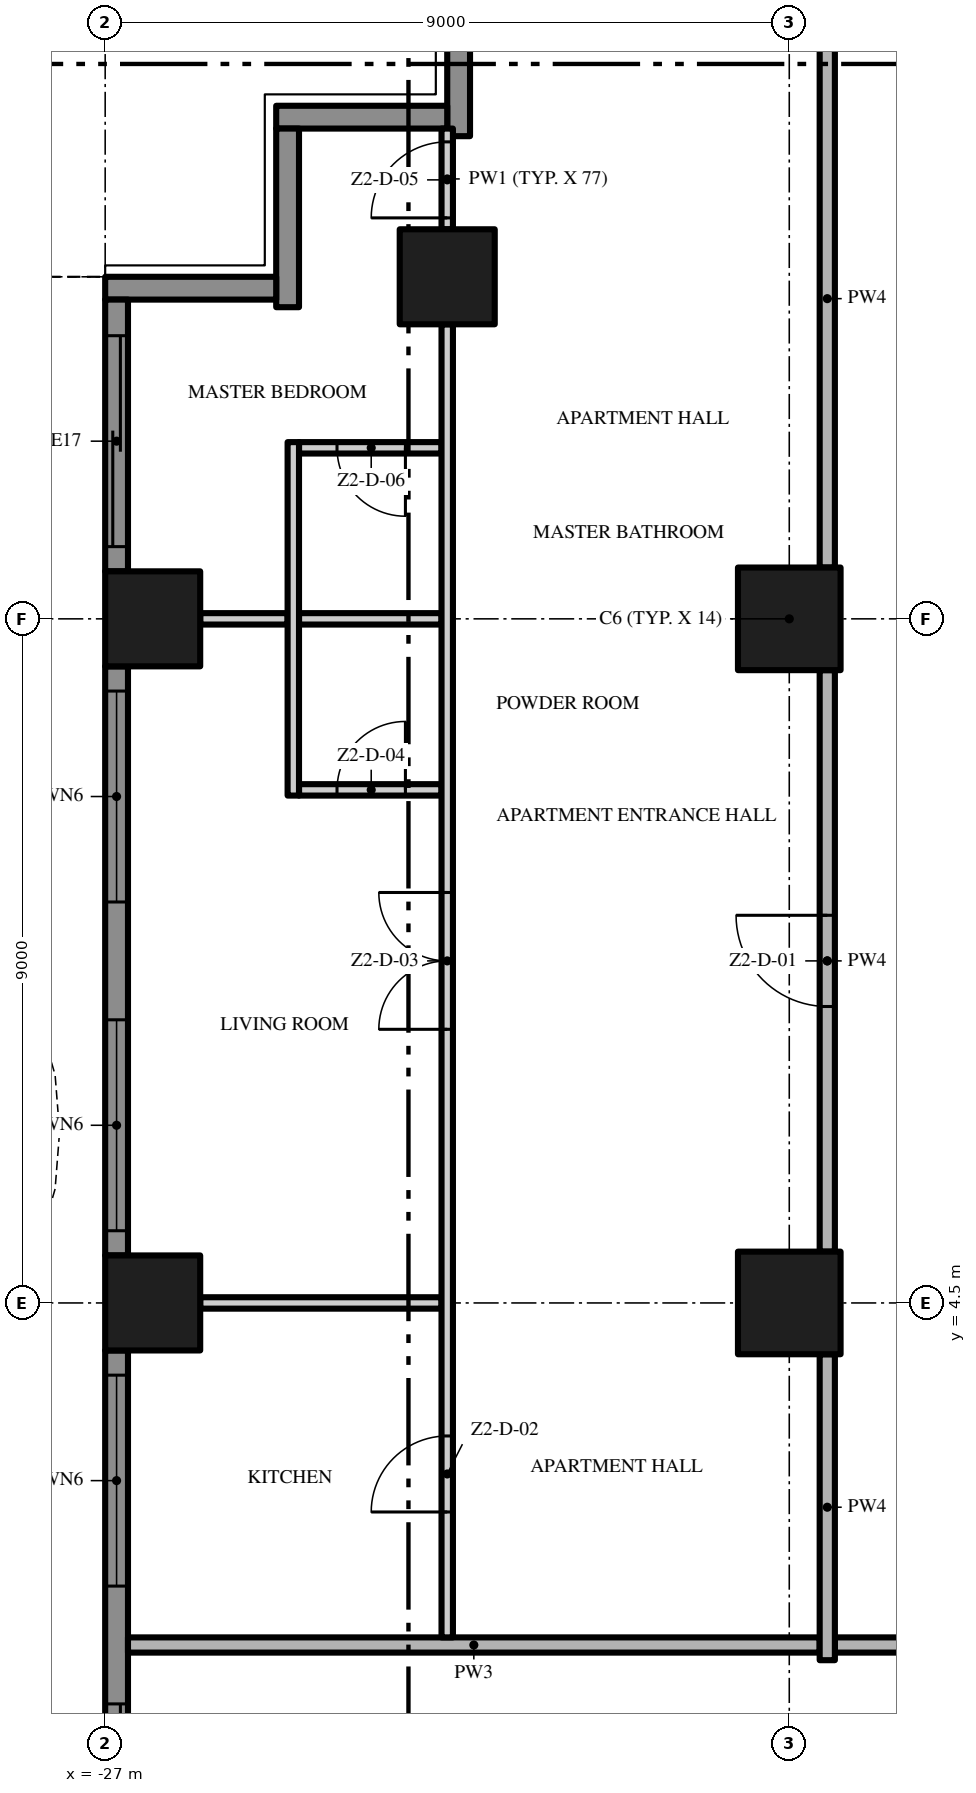
"""IFC4 building model, lengths in metres.
Left out: names, types, materials, properties, quantities, classifications, styles, units other than length and angle.
Written with IfcOpenShell. Run it as: python <this file> out.ifc"""

import sys

from ifc_helpers import new_model, si_unit, direction, frame, frame_2d, origin, origin_2d, place, context, subcontext, project, spatial, polyline, rectangle, outline, extrude, element, fill, save


model = new_model("IFC4")
c1 = context("Model", 3, precision=1e-05, world=origin(), true_north=direction((0.0, 1.0)))
c2 = subcontext(c1, "Body", "Model", "MODEL_VIEW")
j1 = project(units=[si_unit("LENGTHUNIT", "METRE"), si_unit("PLANEANGLEUNIT", "RADIAN")], contexts=[c1])
p1 = place(None, origin())
s1 = spatial("IfcSite", under=j1, at=p1, CompositionType="ELEMENT")
p2 = place(p1, origin())
s2 = spatial("IfcBuilding", under=s1, at=p2, CompositionType="ELEMENT")
p3 = place(p2, frame((0.0, 0.0, 107.4)))
s3 = spatial("IfcBuildingStorey", under=s2, at=p3, CompositionType="ELEMENT", Elevation=107.4)
for number, where, z_axis, x_axis in (
    (1, (-18.0, 13.5, 0.0), (0.0, 0.0, 1.0), (1.0, 0.0, 0.0)),
    (2, (-18.0, 4.5, 0.0), (0.0, 0.0, 1.0), (1.0, 0.0, 0.0)),
):
    element("IfcColumn", number, at=place(p3, frame(where, z_axis=z_axis, x_axis=x_axis)), inside=s3, PredefinedType="COLUMN", context=c2, shape_type="SweptSolid", body=[
        extrude(rectangle(XDim=1.35, YDim=1.35, at=origin_2d()), origin(), (0.0, 0.0, 1.0), 3.5),
    ])
for number, where, z_axis, x_axis in (
    (3, (-26.375, 13.5, 0.0), (0.0, 0.0, 1.0), (1.0, 0.0, 0.0)),
    (4, (-22.5, 18.0, 0.0), (0.0, 0.0, 1.0), (1.0, 0.0, 0.0)),
    (5, (-26.375, 4.5, 0.0), (0.0, 0.0, 1.0), (1.0, 0.0, 0.0)),
):
    element("IfcColumn", number, at=place(p3, frame(where, z_axis=z_axis, x_axis=x_axis)), inside=s3, PredefinedType="COLUMN", context=c2, shape_type="SweptSolid", body=[
        extrude(rectangle(XDim=1.25, YDim=1.25, at=origin_2d()), origin(), (0.0, 0.0, 1.0), 3.5),
    ])
p4 = place(p3, frame((-22.35, 19.85, 0.0), z_axis=(0.0, 0.0, 1.0), x_axis=(0.0, 1.0, 0.0)))
e6 = element("IfcWall", 6, at=p4, inside=s3, PredefinedType="SOLIDWALL", context=c2, shape_type="SweptSolid", body=[
    extrude(rectangle(XDim=2.35, YDim=0.3, at=frame_2d((1.175, 0.0))), origin(), (0.0, 0.0, 1.0), 3.5),
])
p5 = place(p3, frame((-24.75, 20.1, 0.0), z_axis=(0.0, 0.0, 1.0), x_axis=(1.0, 0.0, 0.0)))
e7 = element("IfcWall", 7, at=p5, inside=s3, PredefinedType="SOLIDWALL", context=c2, shape_type="SweptSolid", body=[
    extrude(rectangle(XDim=2.25, YDim=0.3, at=frame_2d((1.125, 0.0))), origin(), (0.0, 0.0, 1.0), 3.5),
])
p6 = place(p3, frame((-24.6, 17.6, 0.0), z_axis=(0.0, 0.0, 1.0), x_axis=(0.0, 1.0, 0.0)))
e8 = element("IfcWall", 8, at=p6, inside=s3, PredefinedType="SOLIDWALL", context=c2, shape_type="SweptSolid", body=[
    extrude(rectangle(XDim=2.35, YDim=0.3, at=frame_2d((1.175, 0.0))), origin(), (0.0, 0.0, 1.0), 3.5),
])
p7 = place(p3, frame((-27.0, 17.85, 0.0), z_axis=(0.0, 0.0, 1.0), x_axis=(1.0, 0.0, 0.0)))
e9 = element("IfcWall", 9, at=p7, inside=s3, PredefinedType="SOLIDWALL", context=c2, shape_type="SweptSolid", body=[
    extrude(rectangle(XDim=2.25, YDim=0.3, at=frame_2d((1.125, 0.0))), origin(), (0.0, 0.0, 1.0), 3.5),
])
p8 = place(p3, frame((-26.85, 14.125, 0.0), z_axis=(0.0, 0.0, 1.0), x_axis=(0.0, 1.0, 0.0)))
e10 = element("IfcWall", 10, at=p8, inside=s3, PredefinedType="SOLIDWALL", context=c2, shape_type="SweptSolid", body=[
    extrude(rectangle(XDim=3.575, YDim=0.3, at=frame_2d((1.788, 0.0))), origin(), (0.0, 0.0, 1.0), 3.5),
])
p9 = place(p8, frame((0.325, 0.0, 0.0)))
e11 = element("IfcOpeningElement", 11, at=p9, cuts=e10, PredefinedType="OPENING", context=c2, shape_type="SweptSolid", body=[
    extrude(rectangle(XDim=2.775, YDim=2.4, at=frame_2d((1.387, 1.2))), frame((0.0, 0.16, 0.0), z_axis=(0.0, -1.0, 0.0), x_axis=(1.0, 0.0, 0.0)), (0.0, 0.0, 1.0), 0.32),
])
p10 = place(p3, frame((-26.85, 5.125, 0.0), z_axis=(0.0, 0.0, 1.0), x_axis=(0.0, 1.0, 0.0)))
e12 = element("IfcWall", 12, at=p10, inside=s3, PredefinedType="SOLIDWALL", context=c2, shape_type="SweptSolid", body=[
    extrude(rectangle(XDim=7.75, YDim=0.3, at=frame_2d((3.875, 0.0))), origin(), (0.0, 0.0, 1.0), 3.5),
])
p11 = place(p10, frame((4.65, 0.0, 0.45)))
e13 = element("IfcOpeningElement", 13, at=p11, cuts=e12, PredefinedType="OPENING", context=c2, shape_type="SweptSolid", body=[
    extrude(rectangle(XDim=2.775, YDim=2.65, at=frame_2d((1.387, 1.325))), frame((0.0, 0.16, 0.0), z_axis=(0.0, -1.0, 0.0), x_axis=(1.0, 0.0, 0.0)), (0.0, 0.0, 1.0), 0.32),
])
p12 = place(p10, frame((0.325, 0.0, 0.45)))
e14 = element("IfcOpeningElement", 14, at=p12, cuts=e12, PredefinedType="OPENING", context=c2, shape_type="SweptSolid", body=[
    extrude(rectangle(XDim=2.775, YDim=2.65, at=frame_2d((1.387, 1.325))), frame((0.0, 0.16, 0.0), z_axis=(0.0, -1.0, 0.0), x_axis=(1.0, 0.0, 0.0)), (0.0, 0.0, 1.0), 0.32),
])
p13 = place(p3, frame((-26.85, -3.875, 0.0), z_axis=(0.0, 0.0, 1.0), x_axis=(0.0, 1.0, 0.0)))
e15 = element("IfcWall", 15, at=p13, inside=s3, PredefinedType="SOLIDWALL", context=c2, shape_type="SweptSolid", body=[
    extrude(rectangle(XDim=7.75, YDim=0.3, at=frame_2d((3.875, 0.0))), origin(), (0.0, 0.0, 1.0), 3.5),
])
p14 = place(p13, frame((4.65, 0.0, 0.45)))
e16 = element("IfcOpeningElement", 16, at=p14, cuts=e15, PredefinedType="OPENING", context=c2, shape_type="SweptSolid", body=[
    extrude(rectangle(XDim=2.775, YDim=2.65, at=frame_2d((1.387, 1.325))), frame((0.0, 0.16, 0.0), z_axis=(0.0, -1.0, 0.0), x_axis=(1.0, 0.0, 0.0)), (0.0, 0.0, 1.0), 0.32),
])
p15 = place(p13, frame((0.325, 0.0, 0.0)))
e17 = element("IfcOpeningElement", 17, at=p15, cuts=e15, PredefinedType="OPENING", context=c2, shape_type="SweptSolid", body=[
    extrude(rectangle(XDim=2.775, YDim=2.4, at=frame_2d((1.387, 1.2))), frame((0.0, 0.16, 0.0), z_axis=(0.0, -1.0, 0.0), x_axis=(1.0, 0.0, 0.0)), (0.0, 0.0, 1.0), 0.32),
])
p16 = place(p3, origin())
e18 = element("IfcWall", 18, at=p16, inside=s3, PredefinedType="USERDEFINED", context=c2, shape_type="SweptSolid", body=[
    extrude(outline(polyline([(-28.8, 18.0), (-29.505, 16.5), (-29.941, 15.0), (-30.0, 14.25), (-29.941, 13.5), (-29.505, 12.0), (-28.8, 10.5), (-28.095, 9.0), (-27.659, 7.5), (-27.6, 6.75), (-27.659, 6.0), (-28.095, 4.5), (-28.8, 3.0), (-29.505, 1.5), (-29.941, 0.0), (-30.0, -0.75), (-29.941, -1.5), (-29.505, -3.0), (-28.8, -4.5), (-28.095, -6.0), (-27.659, -7.5), (-27.6, -8.25), (-27.659, -9.0), (-28.095, -10.5), (-28.8, -12.0), (-29.505, -13.5), (-29.941, -15.0), (-30.0, -15.75), (-29.941, -16.5), (-29.505, -18.0), (-29.265, -17.93), (-29.694, -16.455), (-29.749, -15.75), (-29.694, -15.045), (-29.271, -13.589), (-28.574, -12.106), (-27.86, -10.589), (-27.411, -9.045), (-27.349, -8.25), (-27.411, -7.455), (-27.86, -5.911), (-28.574, -4.394), (-29.271, -2.911), (-29.694, -1.455), (-29.749, -0.75), (-29.694, -0.045), (-29.271, 1.411), (-28.574, 2.894), (-27.86, 4.411), (-27.411, 5.955), (-27.349, 6.75), (-27.411, 7.545), (-27.86, 9.089), (-28.574, 10.606), (-29.271, 12.089), (-29.694, 13.545), (-29.749, 14.25), (-29.694, 14.955), (-29.271, 16.411), (-28.574, 17.894), (-28.8, 18.0)])), origin(), (0.0, 0.0, 1.0), 0.9),
])
p17 = place(p3, frame((-0.1, 0.0, 0.0), z_axis=(0.0, 0.0, 1.0), x_axis=(-1.0, 0.0, 0.0)))
e19 = element("IfcWall", 19, at=p17, inside=s3, PredefinedType="PARTITIONING", context=c2, shape_type="SweptSolid", body=[
    extrude(rectangle(XDim=17.3, YDim=0.2, at=frame_2d((8.65, 0.0))), origin(), (0.0, 0.0, 1.0), 3.5),
])
p18 = place(p17, frame((8.15, 0.0, 0.0)))
e20 = element("IfcOpeningElement", 20, at=p18, cuts=e19, PredefinedType="OPENING", context=c2, shape_type="SweptSolid", body=[
    extrude(rectangle(XDim=1.5, YDim=2.4, at=frame_2d((0.75, 1.2))), frame((0.0, 0.11, 0.0), z_axis=(0.0, -1.0, 0.0), x_axis=(1.0, 0.0, 0.0)), (0.0, 0.0, 1.0), 0.22),
])
p19 = place(p3, frame((-26.7, 0.0, 0.0), z_axis=(0.0, 0.0, 1.0), x_axis=(1.0, 0.0, 0.0)))
e21 = element("IfcWall", 21, at=p19, inside=s3, PredefinedType="PARTITIONING", context=c2, shape_type="SweptSolid", body=[
    extrude(rectangle(XDim=9.1, YDim=0.2, at=frame_2d((4.55, 0.0))), origin(), (0.0, 0.0, 1.0), 3.5),
])
p20 = place(p3, frame((-25.75, 4.5, 0.0), z_axis=(0.0, 0.0, 1.0), x_axis=(1.0, 0.0, 0.0)))
e22 = element("IfcWall", 22, at=p20, inside=s3, PredefinedType="PARTITIONING", context=c2, shape_type="SweptSolid", body=[
    extrude(rectangle(XDim=3.175, YDim=0.15, at=frame_2d((1.587, 0.0))), origin(), (0.0, 0.0, 1.0), 3.5),
])
p21 = place(p3, frame((-24.45, 11.25, 0.0), z_axis=(0.0, 0.0, 1.0), x_axis=(1.0, 0.0, 0.0)))
e23 = element("IfcWall", 23, at=p21, inside=s3, PredefinedType="PARTITIONING", context=c2, shape_type="SweptSolid", body=[
    extrude(rectangle(XDim=1.875, YDim=0.15, at=frame_2d((0.938, 0.0))), origin(), (0.0, 0.0, 1.0), 3.5),
])
p22 = place(p21, frame((0.5, 0.0, 0.0)))
e24 = element("IfcOpeningElement", 24, at=p22, cuts=e23, PredefinedType="OPENING", context=c2, shape_type="SweptSolid", body=[
    extrude(rectangle(XDim=0.9, YDim=2.1, at=frame_2d((0.45, 1.05))), frame((0.0, 0.085, 0.0), z_axis=(0.0, -1.0, 0.0), x_axis=(1.0, 0.0, 0.0)), (0.0, 0.0, 1.0), 0.17),
])
p23 = place(p3, frame((-25.75, 13.5, 0.0), z_axis=(0.0, 0.0, 1.0), x_axis=(1.0, 0.0, 0.0)))
e25 = element("IfcWall", 25, at=p23, inside=s3, PredefinedType="PARTITIONING", context=c2, shape_type="SweptSolid", body=[
    extrude(rectangle(XDim=1.15, YDim=0.15, at=frame_2d((0.575, 0.0))), origin(), (0.0, 0.0, 1.0), 3.5),
])
p24 = place(p3, frame((-24.45, 13.5, 0.0), z_axis=(0.0, 0.0, 1.0), x_axis=(1.0, 0.0, 0.0)))
e26 = element("IfcWall", 26, at=p24, inside=s3, PredefinedType="PARTITIONING", context=c2, shape_type="SweptSolid", body=[
    extrude(rectangle(XDim=1.875, YDim=0.15, at=frame_2d((0.938, 0.0))), origin(), (0.0, 0.0, 1.0), 3.5),
])
p25 = place(p3, frame((-22.575, 15.75, 0.0), z_axis=(0.0, 0.0, 1.0), x_axis=(-1.0, 0.0, 0.0)))
e27 = element("IfcWall", 27, at=p25, inside=s3, PredefinedType="PARTITIONING", context=c2, shape_type="SweptSolid", body=[
    extrude(rectangle(XDim=1.875, YDim=0.15, at=frame_2d((0.938, 0.0))), origin(), (0.0, 0.0, 1.0), 3.5),
])
p26 = place(p25, frame((0.475, 0.0, 0.0)))
e28 = element("IfcOpeningElement", 28, at=p26, cuts=e27, PredefinedType="OPENING", context=c2, shape_type="SweptSolid", body=[
    extrude(rectangle(XDim=0.9, YDim=2.1, at=frame_2d((0.45, 1.05))), frame((0.0, 0.085, 0.0), z_axis=(0.0, -1.0, 0.0), x_axis=(1.0, 0.0, 0.0)), (0.0, 0.0, 1.0), 0.17),
])
p27 = place(p3, frame((-24.525, 11.175, 0.0), z_axis=(0.0, 0.0, 1.0), x_axis=(0.0, 1.0, 0.0)))
e29 = element("IfcWall", 29, at=p27, inside=s3, PredefinedType="PARTITIONING", context=c2, shape_type="SweptSolid", body=[
    extrude(rectangle(XDim=4.65, YDim=0.15, at=frame_2d((2.325, 0.0))), origin(), (0.0, 0.0, 1.0), 3.5),
])
p28 = place(p3, frame((-22.5, 0.1, 0.0), z_axis=(0.0, 0.0, 1.0), x_axis=(0.0, 1.0, 0.0)))
e30 = element("IfcWall", 30, at=p28, inside=s3, PredefinedType="PARTITIONING", context=c2, shape_type="SweptSolid", body=[
    extrude(rectangle(XDim=17.275, YDim=0.15, at=frame_2d((8.637, 0.0))), origin(), (0.0, 0.0, 1.0), 3.5),
])
p29 = place(p28, frame((1.65, 0.0, 0.0)))
e31 = element("IfcOpeningElement", 31, at=p29, cuts=e30, PredefinedType="OPENING", context=c2, shape_type="SweptSolid", body=[
    extrude(rectangle(XDim=1.0, YDim=2.4, at=frame_2d((0.5, 1.2))), frame((0.0, 0.085, 0.0), z_axis=(0.0, -1.0, 0.0), x_axis=(1.0, 0.0, 0.0)), (0.0, 0.0, 1.0), 0.17),
])
p30 = place(p28, frame((8.0, 0.0, 0.0)))
e32 = element("IfcOpeningElement", 32, at=p30, cuts=e30, PredefinedType="OPENING", context=c2, shape_type="SweptSolid", body=[
    extrude(rectangle(XDim=1.8, YDim=2.4, at=frame_2d((0.9, 1.2))), frame((0.0, 0.085, 0.0), z_axis=(0.0, -1.0, 0.0), x_axis=(1.0, 0.0, 0.0)), (0.0, 0.0, 1.0), 0.17),
])
p31 = place(p3, frame((-22.5, 18.625, 0.0), z_axis=(0.0, 0.0, 1.0), x_axis=(0.0, 1.0, 0.0)))
e33 = element("IfcWall", 33, at=p31, inside=s3, PredefinedType="PARTITIONING", context=c2, shape_type="SweptSolid", body=[
    extrude(rectangle(XDim=1.325, YDim=0.15, at=frame_2d((0.662, 0.0))), origin(), (0.0, 0.0, 1.0), 3.5),
])
p32 = place(p31, frame((0.15, 0.0, 0.0)))
e34 = element("IfcOpeningElement", 34, at=p32, cuts=e33, PredefinedType="OPENING", context=c2, shape_type="SweptSolid", body=[
    extrude(rectangle(XDim=1.0, YDim=2.4, at=frame_2d((0.5, 1.2))), frame((0.0, 0.085, 0.0), z_axis=(0.0, -1.0, 0.0), x_axis=(1.0, 0.0, 0.0)), (0.0, 0.0, 1.0), 0.17),
])
p33 = place(p3, frame((-17.5, -0.2, 0.0), z_axis=(0.0, 0.0, 1.0), x_axis=(0.0, 1.0, 0.0)))
e35 = element("IfcWall", 35, at=p33, inside=s3, PredefinedType="PARTITIONING", context=c2, shape_type="SweptSolid", body=[
    extrude(rectangle(XDim=4.025, YDim=0.2, at=frame_2d((2.013, 0.0))), origin(), (0.0, 0.0, 1.0), 3.5),
])
p34 = place(p3, frame((-17.5, 5.175, 0.0), z_axis=(0.0, 0.0, 1.0), x_axis=(0.0, 1.0, 0.0)))
e36 = element("IfcWall", 36, at=p34, inside=s3, PredefinedType="PARTITIONING", context=c2, shape_type="SweptSolid", body=[
    extrude(rectangle(XDim=7.65, YDim=0.2, at=frame_2d((3.825, 0.0))), origin(), (0.0, 0.0, 1.0), 3.5),
])
p35 = place(p34, frame((3.225, 0.0, 0.0)))
e37 = element("IfcOpeningElement", 37, at=p35, cuts=e36, PredefinedType="OPENING", context=c2, shape_type="SweptSolid", body=[
    extrude(rectangle(XDim=1.2, YDim=2.4, at=frame_2d((0.6, 1.2))), frame((0.0, 0.11, 0.0), z_axis=(0.0, -1.0, 0.0), x_axis=(1.0, 0.0, 0.0)), (0.0, 0.0, 1.0), 0.22),
])
p36 = place(p3, frame((-17.5, 14.175, 0.0), z_axis=(0.0, 0.0, 1.0), x_axis=(0.0, 1.0, 0.0)))
e38 = element("IfcWall", 38, at=p36, inside=s3, PredefinedType="PARTITIONING", context=c2, shape_type="SweptSolid", body=[
    extrude(rectangle(XDim=7.075, YDim=0.2, at=frame_2d((3.538, 0.0))), origin(), (0.0, 0.0, 1.0), 3.5),
])
p37 = place(p9, origin())
e39 = element("IfcDoor", 39, at=p37, inside=s3, OperationType="SINGLE_SWING_LEFT", PredefinedType="DOOR", context=c2, shape_type="SweptSolid", body=[
    extrude(rectangle(XDim=2.775, YDim=2.4, at=frame_2d((1.387, 1.2))), frame((0.0, 0.025, 0.0), z_axis=(0.0, -1.0, 0.0), x_axis=(1.0, 0.0, 0.0)), (0.0, 0.0, 1.0), 0.05),
])
fill(e11, e39)
p38 = place(p11, origin())
e40 = element("IfcWindow", 40, at=p38, inside=s3, PartitioningType="SINGLE_PANEL", PredefinedType="WINDOW", context=c2, shape_type="SweptSolid", body=[
    extrude(rectangle(XDim=2.775, YDim=2.65, at=frame_2d((1.387, 1.325))), frame((0.0, 0.03, 0.0), z_axis=(0.0, -1.0, 0.0), x_axis=(1.0, 0.0, 0.0)), (0.0, 0.0, 1.0), 0.06),
])
fill(e13, e40)
p39 = place(p12, origin())
e41 = element("IfcWindow", 41, at=p39, inside=s3, PartitioningType="SINGLE_PANEL", PredefinedType="WINDOW", context=c2, shape_type="SweptSolid", body=[
    extrude(rectangle(XDim=2.775, YDim=2.65, at=frame_2d((1.387, 1.325))), frame((0.0, 0.03, 0.0), z_axis=(0.0, -1.0, 0.0), x_axis=(1.0, 0.0, 0.0)), (0.0, 0.0, 1.0), 0.06),
])
fill(e14, e41)
p40 = place(p14, origin())
e42 = element("IfcWindow", 42, at=p40, inside=s3, PartitioningType="SINGLE_PANEL", PredefinedType="WINDOW", context=c2, shape_type="SweptSolid", body=[
    extrude(rectangle(XDim=2.775, YDim=2.65, at=frame_2d((1.387, 1.325))), frame((0.0, 0.03, 0.0), z_axis=(0.0, -1.0, 0.0), x_axis=(1.0, 0.0, 0.0)), (0.0, 0.0, 1.0), 0.06),
])
fill(e16, e42)
p41 = place(p15, origin())
e43 = element("IfcDoor", 43, at=p41, inside=s3, OperationType="SINGLE_SWING_LEFT", PredefinedType="DOOR", context=c2, shape_type="SweptSolid", body=[
    extrude(rectangle(XDim=2.775, YDim=2.4, at=frame_2d((1.387, 1.2))), frame((0.0, 0.025, 0.0), z_axis=(0.0, -1.0, 0.0), x_axis=(1.0, 0.0, 0.0)), (0.0, 0.0, 1.0), 0.05),
])
fill(e17, e43)
p42 = place(p35, origin())
e44 = element("IfcDoor", 44, at=p42, inside=s3, OperationType="SINGLE_SWING_RIGHT", PredefinedType="DOOR", context=c2, shape_type="SweptSolid", body=[
    extrude(rectangle(XDim=1.2, YDim=2.4, at=frame_2d((0.6, 1.2))), frame((0.0, 0.025, 0.0), z_axis=(0.0, -1.0, 0.0), x_axis=(1.0, 0.0, 0.0)), (0.0, 0.0, 1.0), 0.05),
])
fill(e37, e44)
p43 = place(p29, origin())
e45 = element("IfcDoor", 45, at=p43, inside=s3, OperationType="SINGLE_SWING_LEFT", PredefinedType="DOOR", context=c2, shape_type="SweptSolid", body=[
    extrude(rectangle(XDim=1.0, YDim=2.4, at=frame_2d((0.5, 1.2))), frame((0.0, 0.025, 0.0), z_axis=(0.0, -1.0, 0.0), x_axis=(1.0, 0.0, 0.0)), (0.0, 0.0, 1.0), 0.05),
])
fill(e31, e45)
p44 = place(p30, origin())
e46 = element("IfcDoor", 46, at=p44, inside=s3, OperationType="DOUBLE_DOOR_SINGLE_SWING", PredefinedType="DOOR", context=c2, shape_type="SweptSolid", body=[
    extrude(rectangle(XDim=1.8, YDim=2.4, at=frame_2d((0.9, 1.2))), frame((0.0, 0.025, 0.0), z_axis=(0.0, -1.0, 0.0), x_axis=(1.0, 0.0, 0.0)), (0.0, 0.0, 1.0), 0.05),
])
fill(e32, e46)
p45 = place(p22, origin())
e47 = element("IfcDoor", 47, at=p45, inside=s3, OperationType="SINGLE_SWING_RIGHT", PredefinedType="DOOR", context=c2, shape_type="SweptSolid", body=[
    extrude(rectangle(XDim=0.9, YDim=2.1, at=frame_2d((0.45, 1.05))), frame((0.0, 0.025, 0.0), z_axis=(0.0, -1.0, 0.0), x_axis=(1.0, 0.0, 0.0)), (0.0, 0.0, 1.0), 0.05),
])
fill(e24, e47)
p46 = place(p32, origin())
e48 = element("IfcDoor", 48, at=p46, inside=s3, OperationType="SINGLE_SWING_LEFT", PredefinedType="DOOR", context=c2, shape_type="SweptSolid", body=[
    extrude(rectangle(XDim=1.0, YDim=2.4, at=frame_2d((0.5, 1.2))), frame((0.0, 0.025, 0.0), z_axis=(0.0, -1.0, 0.0), x_axis=(1.0, 0.0, 0.0)), (0.0, 0.0, 1.0), 0.05),
])
fill(e34, e48)
p47 = place(p26, origin())
e49 = element("IfcDoor", 49, at=p47, inside=s3, OperationType="SINGLE_SWING_LEFT", PredefinedType="DOOR", context=c2, shape_type="SweptSolid", body=[
    extrude(rectangle(XDim=0.9, YDim=2.1, at=frame_2d((0.45, 1.05))), frame((0.0, 0.025, 0.0), z_axis=(0.0, -1.0, 0.0), x_axis=(1.0, 0.0, 0.0)), (0.0, 0.0, 1.0), 0.05),
])
fill(e28, e49)
save(model, sys.argv[1])
